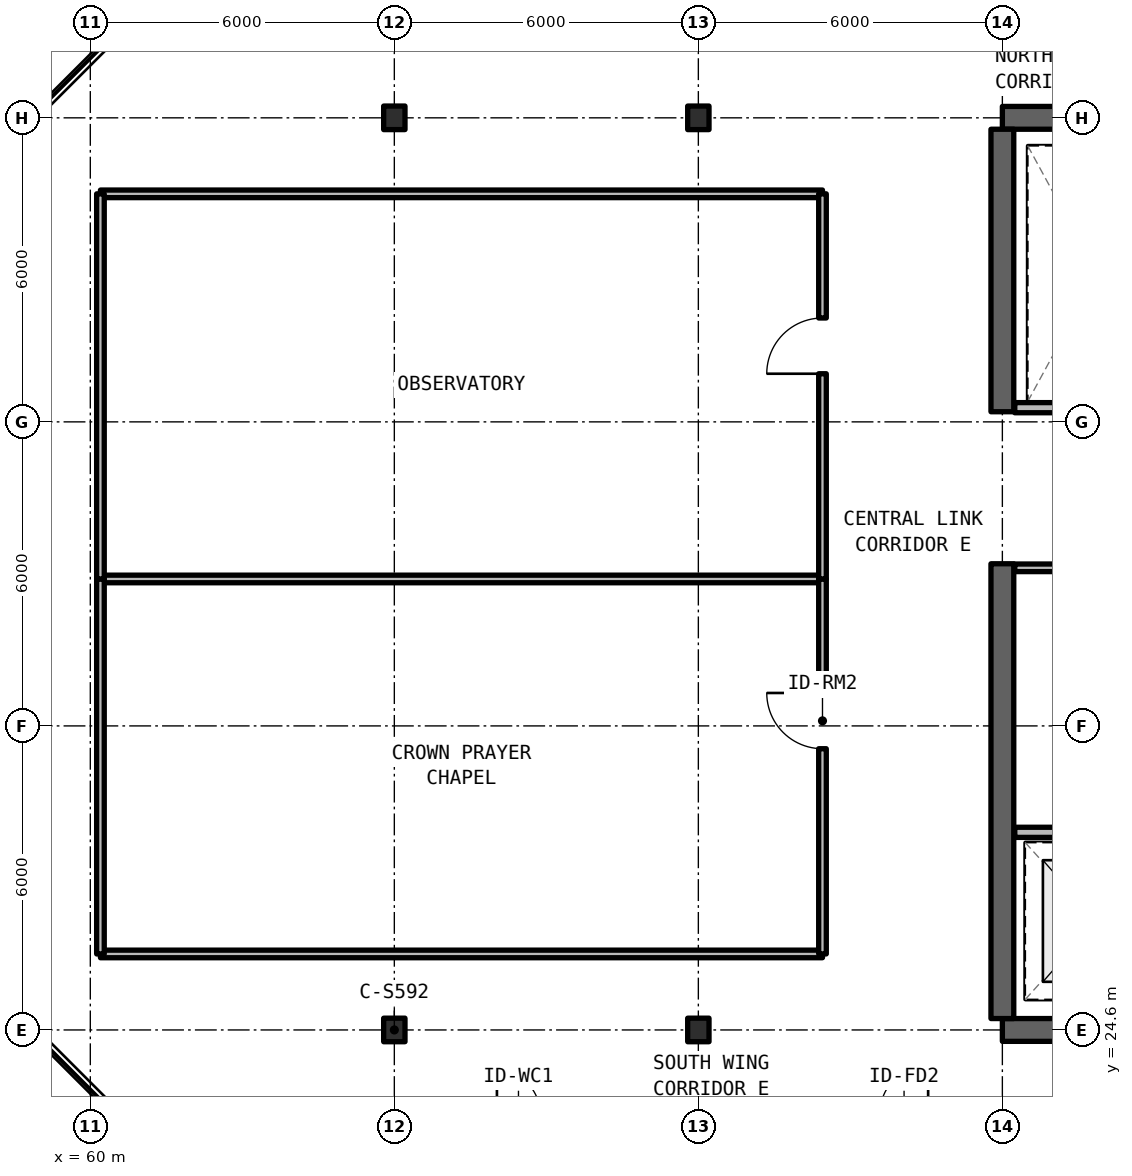
"""IFC4 building model, lengths in metres.
Left out: names, types, materials, properties, quantities, classifications, styles, units other than length and angle.
Written with IfcOpenShell. Run it as: python <this file> out.ifc"""

import sys

from ifc_helpers import new_model, si_unit, direction, frame, frame_2d, origin, origin_2d, place, context, subcontext, project, spatial, rectangle, i_section, extrude, element, fill, save


model = new_model("IFC4")
c1 = context("Model", 3, precision=1e-05, world=origin(), true_north=direction((0.0, 1.0)))
c2 = subcontext(c1, "Body", "Model", "MODEL_VIEW")
j1 = project(units=[si_unit("LENGTHUNIT", "METRE"), si_unit("PLANEANGLEUNIT", "RADIAN")], contexts=[c1])
p1 = place(None, origin())
s1 = spatial("IfcSite", under=j1, at=p1, CompositionType="ELEMENT")
p2 = place(p1, origin())
s2 = spatial("IfcBuilding", under=s1, at=p2, CompositionType="ELEMENT")
p3 = place(p2, frame((0.0, 0.0, 260.7)))
s3 = spatial("IfcBuildingStorey", under=s2, at=p3, CompositionType="ELEMENT", Elevation=260.7)
for number, where, z_axis, x_axis in (
    (1, (78.0, 24.6, 0.0), (0.0, 0.0, 1.0), (1.0, 0.0, 0.0)),
    (2, (90.0, 42.6, 0.0), (0.0, 0.0, 1.0), (-1.0, 0.0, 0.0)),
):
    element("IfcWall", number, at=place(p3, frame(where, z_axis=z_axis, x_axis=x_axis)), inside=s3, PredefinedType="SHEAR", context=c2, shape_type="SweptSolid", body=[
        extrude(rectangle(XDim=12.0, YDim=0.45, at=frame_2d((6.0, 0.0))), origin(), (0.0, 0.0, 1.0), 3.63),
    ])
p4 = place(p3, frame((78.0, 24.825, 0.0), z_axis=(0.0, 0.0, 1.0), x_axis=(0.0, 1.0, 0.0)))
e3 = element("IfcWall", 3, at=p4, inside=s3, PredefinedType="SHEAR", context=c2, shape_type="SweptSolid", body=[
    extrude(rectangle(XDim=8.975, YDim=0.45, at=frame_2d((4.488, 0.0))), origin(), (0.0, 0.0, 1.0), 3.63),
])
p5 = place(p3, frame((78.0, 36.8, 0.0), z_axis=(0.0, 0.0, 1.0), x_axis=(0.0, 1.0, 0.0)))
e4 = element("IfcWall", 4, at=p5, inside=s3, PredefinedType="SHEAR", context=c2, shape_type="SweptSolid", body=[
    extrude(rectangle(XDim=5.575, YDim=0.45, at=frame_2d((2.788, 0.0))), origin(), (0.0, 0.0, 1.0), 3.63),
])
for number, where, z_axis, x_axis in (
    (5, (66.0, 24.6, 0.0), (0.0, 0.0, 1.0), (1.0, 0.0, 0.0)),
    (6, (66.0, 42.6, 0.0), (0.0, 0.0, 1.0), (1.0, 0.0, 0.0)),
    (7, (72.0, 24.6, 0.0), (0.0, 0.0, 1.0), (1.0, 0.0, 0.0)),
    (8, (72.0, 42.6, 0.0), (0.0, 0.0, 1.0), (1.0, 0.0, 0.0)),
):
    element("IfcColumn", number, at=place(p3, frame(where, z_axis=z_axis, x_axis=x_axis)), inside=s3, PredefinedType="COLUMN", context=c2, shape_type="SweptSolid", body=[
        extrude(i_section(OverallWidth=0.421, OverallDepth=0.465, WebThickness=0.045, FlangeThickness=0.07, FilletRadius=0.015, at=origin_2d()), origin(), (0.0, 0.0, 1.0), 3.63),
    ])
p6 = place(p3, frame((78.245, 28.5, 0.0), z_axis=(0.0, 0.0, 1.0), x_axis=(1.0, 0.0, 0.0)))
e9 = element("IfcWall", 9, at=p6, inside=s3, PredefinedType="SOLIDWALL", context=c2, shape_type="SweptSolid", body=[
    extrude(rectangle(XDim=7.585, YDim=0.2, at=frame_2d((3.792, 0.0))), origin(), (0.0, 0.0, 1.0), 2.63),
])
p7 = place(p6, frame((3.555, 0.0, 0.0)))
e10 = element("IfcOpeningElement", 10, at=p7, cuts=e9, PredefinedType="OPENING", context=c2, shape_type="SweptSolid", body=[
    extrude(rectangle(XDim=1.0, YDim=2.15, at=frame_2d((0.5, 1.075))), frame((0.0, 0.11, 0.0), z_axis=(0.0, -1.0, 0.0), x_axis=(1.0, 0.0, 0.0)), (0.0, 0.0, 1.0), 0.22),
])
p8 = place(p3, frame((78.245, 33.72, 0.0), z_axis=(0.0, 0.0, 1.0), x_axis=(1.0, 0.0, 0.0)))
e11 = element("IfcWall", 11, at=p8, inside=s3, PredefinedType="SOLIDWALL", context=c2, shape_type="SweptSolid", body=[
    extrude(rectangle(XDim=3.075, YDim=0.15, at=frame_2d((1.538, 0.0))), origin(), (0.0, 0.0, 1.0), 2.63),
])
p9 = place(p3, frame((78.245, 36.88, 0.0), z_axis=(0.0, 0.0, 1.0), x_axis=(1.0, 0.0, 0.0)))
e12 = element("IfcWall", 12, at=p9, inside=s3, PredefinedType="SOLIDWALL", context=c2, shape_type="SweptSolid", body=[
    extrude(rectangle(XDim=3.075, YDim=0.2, at=frame_2d((1.538, 0.0))), origin(), (0.0, 0.0, 1.0), 2.63),
])
for number, where, z_axis, x_axis in (
    (13, (60.2, 26.1, 0.0), (0.0, 0.0, 1.0), (1.0, 0.0, 0.0)),
    (14, (60.2, 33.5, 0.0), (0.0, 0.0, 1.0), (1.0, 0.0, 0.0)),
):
    element("IfcWall", number, at=place(p3, frame(where, z_axis=z_axis, x_axis=x_axis)), inside=s3, PredefinedType="SOLIDWALL", context=c2, shape_type="SweptSolid", body=[
        extrude(rectangle(XDim=14.25, YDim=0.15, at=frame_2d((7.125, 0.0))), origin(), (0.0, 0.0, 1.0), 2.63),
    ])
p10 = place(p3, frame((60.2, 26.1, 0.0), z_axis=(0.0, 0.0, 1.0), x_axis=(0.0, 1.0, 0.0)))
e15 = element("IfcWall", 15, at=p10, inside=s3, PredefinedType="SOLIDWALL", context=c2, shape_type="SweptSolid", body=[
    extrude(rectangle(XDim=7.4, YDim=0.15, at=frame_2d((3.7, 0.0))), origin(), (0.0, 0.0, 1.0), 2.63),
])
p11 = place(p3, frame((74.45, 26.1, 0.0), z_axis=(0.0, 0.0, 1.0), x_axis=(0.0, 1.0, 0.0)))
e16 = element("IfcWall", 16, at=p11, inside=s3, PredefinedType="SOLIDWALL", context=c2, shape_type="SweptSolid", body=[
    extrude(rectangle(XDim=7.4, YDim=0.15, at=frame_2d((3.7, 0.0))), origin(), (0.0, 0.0, 1.0), 2.63),
])
p12 = place(p11, frame((4.05, 0.0, 0.0)))
e17 = element("IfcOpeningElement", 17, at=p12, cuts=e16, PredefinedType="OPENING", context=c2, shape_type="SweptSolid", body=[
    extrude(rectangle(XDim=1.1, YDim=2.15, at=frame_2d((0.55, 1.075))), frame((0.0, 0.085, 0.0), z_axis=(0.0, -1.0, 0.0), x_axis=(1.0, 0.0, 0.0)), (0.0, 0.0, 1.0), 0.17),
])
p13 = place(p3, frame((60.2, 41.1, 0.0), z_axis=(0.0, 0.0, 1.0), x_axis=(1.0, 0.0, 0.0)))
e18 = element("IfcWall", 18, at=p13, inside=s3, PredefinedType="SOLIDWALL", context=c2, shape_type="SweptSolid", body=[
    extrude(rectangle(XDim=14.25, YDim=0.15, at=frame_2d((7.125, 0.0))), origin(), (0.0, 0.0, 1.0), 2.63),
])
p14 = place(p3, frame((60.2, 33.5, 0.0), z_axis=(0.0, 0.0, 1.0), x_axis=(0.0, 1.0, 0.0)))
e19 = element("IfcWall", 19, at=p14, inside=s3, PredefinedType="SOLIDWALL", context=c2, shape_type="SweptSolid", body=[
    extrude(rectangle(XDim=7.6, YDim=0.15, at=frame_2d((3.8, 0.0))), origin(), (0.0, 0.0, 1.0), 2.63),
])
p15 = place(p3, frame((74.45, 33.5, 0.0), z_axis=(0.0, 0.0, 1.0), x_axis=(0.0, 1.0, 0.0)))
e20 = element("IfcWall", 20, at=p15, inside=s3, PredefinedType="SOLIDWALL", context=c2, shape_type="SweptSolid", body=[
    extrude(rectangle(XDim=7.6, YDim=0.15, at=frame_2d((3.8, 0.0))), origin(), (0.0, 0.0, 1.0), 2.63),
])
p16 = place(p15, frame((4.05, 0.0, 0.0)))
e21 = element("IfcOpeningElement", 21, at=p16, cuts=e20, PredefinedType="OPENING", context=c2, shape_type="SweptSolid", body=[
    extrude(rectangle(XDim=1.1, YDim=2.15, at=frame_2d((0.55, 1.075))), frame((0.0, 0.085, 0.0), z_axis=(0.0, -1.0, 0.0), x_axis=(1.0, 0.0, 0.0)), (0.0, 0.0, 1.0), 0.17),
])
p17 = place(p12, origin())
e22 = element("IfcDoor", 22, at=p17, inside=s3, OperationType="SINGLE_SWING_RIGHT", PredefinedType="DOOR", context=c2, shape_type="SweptSolid", body=[
    extrude(rectangle(XDim=1.1, YDim=2.15, at=frame_2d((0.55, 1.075))), frame((0.0, 0.025, 0.0), z_axis=(0.0, -1.0, 0.0), x_axis=(1.0, 0.0, 0.0)), (0.0, 0.0, 1.0), 0.05),
])
fill(e17, e22)
p18 = place(p16, origin())
e23 = element("IfcDoor", 23, at=p18, inside=s3, OperationType="SINGLE_SWING_LEFT", PredefinedType="DOOR", context=c2, shape_type="SweptSolid", body=[
    extrude(rectangle(XDim=1.1, YDim=2.15, at=frame_2d((0.55, 1.075))), frame((0.0, 0.025, 0.0), z_axis=(0.0, -1.0, 0.0), x_axis=(1.0, 0.0, 0.0)), (0.0, 0.0, 1.0), 0.05),
])
fill(e21, e23)
save(model, sys.argv[1])
